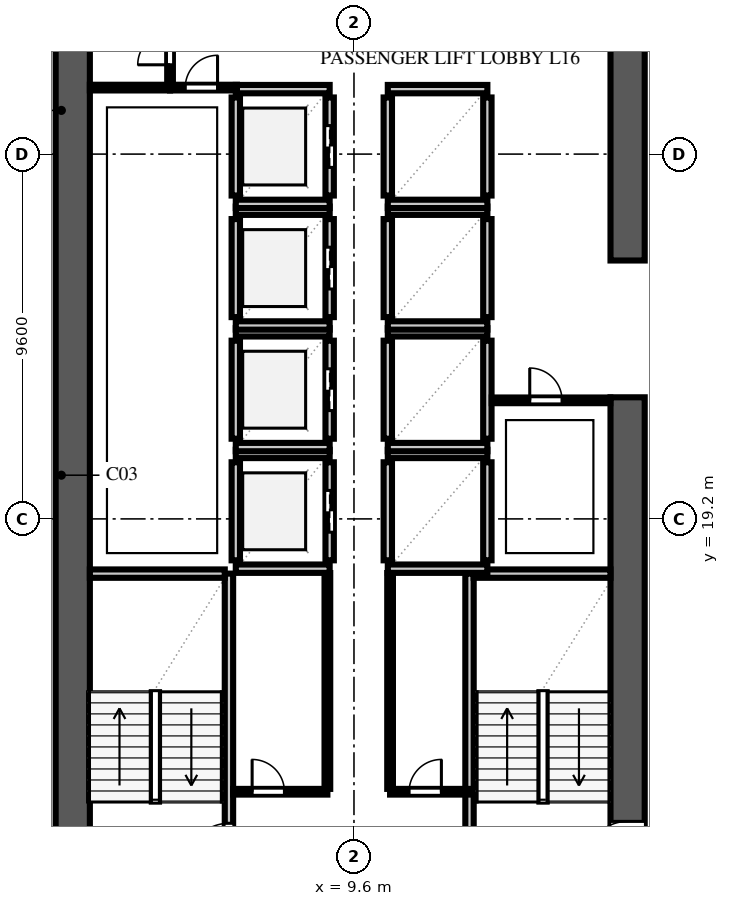
"""IFC4 building model, lengths in metres.
Left out: names, types, materials, properties, quantities, classifications, styles, units other than length and angle.
Written with IfcOpenShell. Run it as: python <this file> out.ifc"""

import sys

from ifc_helpers import new_model, si_unit, direction, frame, frame_2d, origin, place, context, subcontext, project, spatial, rectangle, extrude, element, fill, save


model = new_model("IFC4")
c1 = context("Model", 3, precision=1e-05, world=origin(), true_north=direction((0.0, 1.0)))
c2 = subcontext(c1, "Body", "Model", "MODEL_VIEW")
j1 = project(units=[si_unit("LENGTHUNIT", "METRE"), si_unit("PLANEANGLEUNIT", "RADIAN")], contexts=[c1])
p1 = place(None, origin())
s1 = spatial("IfcSite", under=j1, at=p1, CompositionType="ELEMENT")
p2 = place(p1, origin())
s2 = spatial("IfcBuilding", under=s1, at=p2, CompositionType="ELEMENT")
p3 = place(p2, frame((0.0, 0.0, 66.0)))
s3 = spatial("IfcBuildingStorey", under=s2, at=p3, CompositionType="ELEMENT", Elevation=66.0)
p4 = place(p3, frame((2.2, 9.15, 0.0), z_axis=(0.0, 0.0, 1.0), x_axis=(0.0, 1.0, 0.0)))
e1 = element("IfcWall", 1, at=p4, inside=s3, PredefinedType="SHEAR", context=c2, shape_type="SweptSolid", body=[
    extrude(rectangle(XDim=39.3, YDim=0.9, at=frame_2d((19.65, 0.0))), origin(), (0.0, 0.0, 1.0), 3.54),
])
p5 = place(p3, frame((16.8, 10.05, 0.0), z_axis=(0.0, 0.0, 1.0), x_axis=(0.0, 1.0, 0.0)))
e2 = element("IfcWall", 2, at=p5, inside=s3, PredefinedType="SHEAR", context=c2, shape_type="SweptSolid", body=[
    extrude(rectangle(XDim=12.35, YDim=0.9, at=frame_2d((6.175, 0.0))), origin(), (0.0, 0.0, 1.0), 3.54),
])
p6 = place(p5, frame((0.09, 0.0, 0.0)))
e3 = element("IfcOpeningElement", 3, at=p6, cuts=e2, PredefinedType="OPENING", context=c2, shape_type="SweptSolid", body=[
    extrude(rectangle(XDim=1.1, YDim=2.2, at=frame_2d((0.55, 1.1))), frame((0.0, 0.462, 0.0), z_axis=(0.0, -1.0, 0.0), x_axis=(1.0, 0.0, 0.0)), (0.0, 0.0, 1.0), 0.924),
])
p7 = place(p3, frame((16.8, 26.0, 0.0), z_axis=(0.0, 0.0, 1.0), x_axis=(0.0, 1.0, 0.0)))
e4 = element("IfcWall", 4, at=p7, inside=s3, PredefinedType="SHEAR", context=c2, shape_type="SweptSolid", body=[
    extrude(rectangle(XDim=7.8, YDim=0.9, at=frame_2d((3.9, 0.0))), origin(), (0.0, 0.0, 1.0), 3.54),
])
p8 = place(p3, frame((6.31, 9.95, 0.0), z_axis=(0.0, 0.0, 1.0), x_axis=(0.0, 1.0, 0.0)))
e5 = element("IfcWall", 5, at=p8, inside=s3, PredefinedType="SOLIDWALL", context=c2, shape_type="SweptSolid", body=[
    extrude(rectangle(XDim=7.81, YDim=0.22, at=frame_2d((3.905, 0.0))), origin(), (0.0, 0.0, 1.0), 3.54),
])
p9 = place(p8, frame((0.14, 0.0, 0.0)))
e6 = element("IfcOpeningElement", 6, at=p9, cuts=e5, PredefinedType="OPENING", context=c2, shape_type="SweptSolid", body=[
    extrude(rectangle(XDim=1.1, YDim=2.2, at=frame_2d((0.55, 1.1))), frame((0.0, 0.122, 0.0), z_axis=(0.0, -1.0, 0.0), x_axis=(1.0, 0.0, 0.0)), (0.0, 0.0, 1.0), 0.244),
])
p10 = place(p3, frame((2.65, 17.76, 0.0), z_axis=(0.0, 0.0, 1.0), x_axis=(1.0, 0.0, 0.0)))
e7 = element("IfcWall", 7, at=p10, inside=s3, PredefinedType="SOLIDWALL", context=c2, shape_type="SweptSolid", body=[
    extrude(rectangle(XDim=3.55, YDim=0.22, at=frame_2d((1.775, 0.0))), origin(), (0.0, 0.0, 1.0), 3.54),
])
p11 = place(p3, frame((12.64, 10.05, 0.0), z_axis=(0.0, 0.0, 1.0), x_axis=(0.0, 1.0, 0.0)))
e8 = element("IfcWall", 8, at=p11, inside=s3, PredefinedType="SOLIDWALL", context=c2, shape_type="SweptSolid", body=[
    extrude(rectangle(XDim=7.71, YDim=0.22, at=frame_2d((3.855, 0.0))), origin(), (0.0, 0.0, 1.0), 3.54),
])
p12 = place(p3, frame((12.75, 17.76, 0.0), z_axis=(0.0, 0.0, 1.0), x_axis=(1.0, 0.0, 0.0)))
e9 = element("IfcWall", 9, at=p12, inside=s3, PredefinedType="SOLIDWALL", context=c2, shape_type="SweptSolid", body=[
    extrude(rectangle(XDim=3.6, YDim=0.22, at=frame_2d((1.8, 0.0))), origin(), (0.0, 0.0, 1.0), 3.54),
])
p13 = place(p3, frame((6.49, 18.11, 0.0), z_axis=(0.0, 0.0, 1.0), x_axis=(0.0, 1.0, 0.0)))
e10 = element("IfcWall", 10, at=p13, inside=s3, PredefinedType="SOLIDWALL", context=c2, shape_type="SweptSolid", body=[
    extrude(rectangle(XDim=2.58, YDim=0.22, at=frame_2d((1.29, 0.0))), origin(), (0.0, 0.0, 1.0), 3.54),
])
p14 = place(p3, frame((8.96, 18.11, 0.0), z_axis=(0.0, 0.0, 1.0), x_axis=(0.0, 1.0, 0.0)))
e11 = element("IfcWall", 11, at=p14, inside=s3, PredefinedType="SOLIDWALL", context=c2, shape_type="SweptSolid", body=[
    extrude(rectangle(XDim=2.58, YDim=0.22, at=frame_2d((1.29, 0.0))), origin(), (0.0, 0.0, 1.0), 3.54),
])
p15 = place(p14, frame((0.74, 0.0, 0.0)))
e12 = element("IfcOpeningElement", 12, at=p15, cuts=e11, PredefinedType="OPENING", context=c2, shape_type="SweptSolid", body=[
    extrude(rectangle(XDim=1.1, YDim=2.2, at=frame_2d((0.55, 1.1))), frame((0.0, 0.122, 0.0), z_axis=(0.0, -1.0, 0.0), x_axis=(1.0, 0.0, 0.0)), (0.0, 0.0, 1.0), 0.244),
])
for number, where, z_axis, x_axis in (
    (13, (6.49, 17.89, 0.0), (0.0, 0.0, 1.0), (1.0, 0.0, 0.0)),
    (14, (6.49, 20.91, 0.0), (0.0, 0.0, 1.0), (1.0, 0.0, 0.0)),
):
    element("IfcWall", number, at=place(p3, frame(where, z_axis=z_axis, x_axis=x_axis)), inside=s3, PredefinedType="SOLIDWALL", context=c2, shape_type="SweptSolid", body=[
        extrude(rectangle(XDim=2.47, YDim=0.22, at=frame_2d((1.235, 0.0))), origin(), (0.0, 0.0, 1.0), 3.54),
    ])
p16 = place(p3, frame((6.49, 21.31, 0.0), z_axis=(0.0, 0.0, 1.0), x_axis=(0.0, 1.0, 0.0)))
e15 = element("IfcWall", 15, at=p16, inside=s3, PredefinedType="SOLIDWALL", context=c2, shape_type="SweptSolid", body=[
    extrude(rectangle(XDim=2.58, YDim=0.22, at=frame_2d((1.29, 0.0))), origin(), (0.0, 0.0, 1.0), 3.54),
])
p17 = place(p3, frame((8.96, 21.31, 0.0), z_axis=(0.0, 0.0, 1.0), x_axis=(0.0, 1.0, 0.0)))
e16 = element("IfcWall", 16, at=p17, inside=s3, PredefinedType="SOLIDWALL", context=c2, shape_type="SweptSolid", body=[
    extrude(rectangle(XDim=2.58, YDim=0.22, at=frame_2d((1.29, 0.0))), origin(), (0.0, 0.0, 1.0), 3.54),
])
p18 = place(p17, frame((0.74, 0.0, 0.0)))
e17 = element("IfcOpeningElement", 17, at=p18, cuts=e16, PredefinedType="OPENING", context=c2, shape_type="SweptSolid", body=[
    extrude(rectangle(XDim=1.1, YDim=2.2, at=frame_2d((0.55, 1.1))), frame((0.0, 0.122, 0.0), z_axis=(0.0, -1.0, 0.0), x_axis=(1.0, 0.0, 0.0)), (0.0, 0.0, 1.0), 0.244),
])
for number, where, z_axis, x_axis in (
    (18, (6.49, 21.09, 0.0), (0.0, 0.0, 1.0), (1.0, 0.0, 0.0)),
    (19, (6.49, 24.11, 0.0), (0.0, 0.0, 1.0), (1.0, 0.0, 0.0)),
):
    element("IfcWall", number, at=place(p3, frame(where, z_axis=z_axis, x_axis=x_axis)), inside=s3, PredefinedType="SOLIDWALL", context=c2, shape_type="SweptSolid", body=[
        extrude(rectangle(XDim=2.47, YDim=0.22, at=frame_2d((1.235, 0.0))), origin(), (0.0, 0.0, 1.0), 3.54),
    ])
p19 = place(p3, frame((6.49, 24.51, 0.0), z_axis=(0.0, 0.0, 1.0), x_axis=(0.0, 1.0, 0.0)))
e20 = element("IfcWall", 20, at=p19, inside=s3, PredefinedType="SOLIDWALL", context=c2, shape_type="SweptSolid", body=[
    extrude(rectangle(XDim=2.58, YDim=0.22, at=frame_2d((1.29, 0.0))), origin(), (0.0, 0.0, 1.0), 3.54),
])
p20 = place(p3, frame((8.96, 24.51, 0.0), z_axis=(0.0, 0.0, 1.0), x_axis=(0.0, 1.0, 0.0)))
e21 = element("IfcWall", 21, at=p20, inside=s3, PredefinedType="SOLIDWALL", context=c2, shape_type="SweptSolid", body=[
    extrude(rectangle(XDim=2.58, YDim=0.22, at=frame_2d((1.29, 0.0))), origin(), (0.0, 0.0, 1.0), 3.54),
])
p21 = place(p20, frame((0.74, 0.0, 0.0)))
e22 = element("IfcOpeningElement", 22, at=p21, cuts=e21, PredefinedType="OPENING", context=c2, shape_type="SweptSolid", body=[
    extrude(rectangle(XDim=1.1, YDim=2.2, at=frame_2d((0.55, 1.1))), frame((0.0, 0.122, 0.0), z_axis=(0.0, -1.0, 0.0), x_axis=(1.0, 0.0, 0.0)), (0.0, 0.0, 1.0), 0.244),
])
for number, where, z_axis, x_axis in (
    (23, (6.49, 24.29, 0.0), (0.0, 0.0, 1.0), (1.0, 0.0, 0.0)),
    (24, (6.49, 27.31, 0.0), (0.0, 0.0, 1.0), (1.0, 0.0, 0.0)),
):
    element("IfcWall", number, at=place(p3, frame(where, z_axis=z_axis, x_axis=x_axis)), inside=s3, PredefinedType="SOLIDWALL", context=c2, shape_type="SweptSolid", body=[
        extrude(rectangle(XDim=2.47, YDim=0.22, at=frame_2d((1.235, 0.0))), origin(), (0.0, 0.0, 1.0), 3.54),
    ])
p22 = place(p3, frame((6.49, 27.71, 0.0), z_axis=(0.0, 0.0, 1.0), x_axis=(0.0, 1.0, 0.0)))
e25 = element("IfcWall", 25, at=p22, inside=s3, PredefinedType="SOLIDWALL", context=c2, shape_type="SweptSolid", body=[
    extrude(rectangle(XDim=2.58, YDim=0.22, at=frame_2d((1.29, 0.0))), origin(), (0.0, 0.0, 1.0), 3.54),
])
p23 = place(p3, frame((8.96, 27.71, 0.0), z_axis=(0.0, 0.0, 1.0), x_axis=(0.0, 1.0, 0.0)))
e26 = element("IfcWall", 26, at=p23, inside=s3, PredefinedType="SOLIDWALL", context=c2, shape_type="SweptSolid", body=[
    extrude(rectangle(XDim=2.58, YDim=0.22, at=frame_2d((1.29, 0.0))), origin(), (0.0, 0.0, 1.0), 3.54),
])
p24 = place(p23, frame((0.74, 0.0, 0.0)))
e27 = element("IfcOpeningElement", 27, at=p24, cuts=e26, PredefinedType="OPENING", context=c2, shape_type="SweptSolid", body=[
    extrude(rectangle(XDim=1.1, YDim=2.2, at=frame_2d((0.55, 1.1))), frame((0.0, 0.122, 0.0), z_axis=(0.0, -1.0, 0.0), x_axis=(1.0, 0.0, 0.0)), (0.0, 0.0, 1.0), 0.244),
])
for number, where, z_axis, x_axis in (
    (28, (6.49, 27.49, 0.0), (0.0, 0.0, 1.0), (1.0, 0.0, 0.0)),
    (29, (6.49, 30.51, 0.0), (0.0, 0.0, 1.0), (1.0, 0.0, 0.0)),
):
    element("IfcWall", number, at=place(p3, frame(where, z_axis=z_axis, x_axis=x_axis)), inside=s3, PredefinedType="SOLIDWALL", context=c2, shape_type="SweptSolid", body=[
        extrude(rectangle(XDim=2.47, YDim=0.22, at=frame_2d((1.235, 0.0))), origin(), (0.0, 0.0, 1.0), 3.54),
    ])
for number, where, z_axis, x_axis in (
    (30, (10.49, 18.11, 0.0), (0.0, 0.0, 1.0), (0.0, 1.0, 0.0)),
    (31, (13.11, 18.11, 0.0), (0.0, 0.0, 1.0), (0.0, 1.0, 0.0)),
):
    element("IfcWall", number, at=place(p3, frame(where, z_axis=z_axis, x_axis=x_axis)), inside=s3, PredefinedType="SOLIDWALL", context=c2, shape_type="SweptSolid", body=[
        extrude(rectangle(XDim=2.58, YDim=0.22, at=frame_2d((1.29, 0.0))), origin(), (0.0, 0.0, 1.0), 3.54),
    ])
for number, where, z_axis, x_axis in (
    (32, (10.49, 17.89, 0.0), (0.0, 0.0, 1.0), (1.0, 0.0, 0.0)),
    (33, (10.49, 20.91, 0.0), (0.0, 0.0, 1.0), (1.0, 0.0, 0.0)),
):
    element("IfcWall", number, at=place(p3, frame(where, z_axis=z_axis, x_axis=x_axis)), inside=s3, PredefinedType="SOLIDWALL", context=c2, shape_type="SweptSolid", body=[
        extrude(rectangle(XDim=2.62, YDim=0.22, at=frame_2d((1.31, 0.0))), origin(), (0.0, 0.0, 1.0), 3.54),
    ])
for number, where, z_axis, x_axis in (
    (34, (10.49, 21.31, 0.0), (0.0, 0.0, 1.0), (0.0, 1.0, 0.0)),
    (35, (13.11, 21.31, 0.0), (0.0, 0.0, 1.0), (0.0, 1.0, 0.0)),
):
    element("IfcWall", number, at=place(p3, frame(where, z_axis=z_axis, x_axis=x_axis)), inside=s3, PredefinedType="SOLIDWALL", context=c2, shape_type="SweptSolid", body=[
        extrude(rectangle(XDim=2.58, YDim=0.22, at=frame_2d((1.29, 0.0))), origin(), (0.0, 0.0, 1.0), 3.54),
    ])
for number, where, z_axis, x_axis in (
    (36, (10.49, 21.09, 0.0), (0.0, 0.0, 1.0), (1.0, 0.0, 0.0)),
    (37, (10.49, 24.11, 0.0), (0.0, 0.0, 1.0), (1.0, 0.0, 0.0)),
):
    element("IfcWall", number, at=place(p3, frame(where, z_axis=z_axis, x_axis=x_axis)), inside=s3, PredefinedType="SOLIDWALL", context=c2, shape_type="SweptSolid", body=[
        extrude(rectangle(XDim=2.62, YDim=0.22, at=frame_2d((1.31, 0.0))), origin(), (0.0, 0.0, 1.0), 3.54),
    ])
for number, where, z_axis, x_axis in (
    (38, (10.49, 24.51, 0.0), (0.0, 0.0, 1.0), (0.0, 1.0, 0.0)),
    (39, (13.11, 24.51, 0.0), (0.0, 0.0, 1.0), (0.0, 1.0, 0.0)),
):
    element("IfcWall", number, at=place(p3, frame(where, z_axis=z_axis, x_axis=x_axis)), inside=s3, PredefinedType="SOLIDWALL", context=c2, shape_type="SweptSolid", body=[
        extrude(rectangle(XDim=2.58, YDim=0.22, at=frame_2d((1.29, 0.0))), origin(), (0.0, 0.0, 1.0), 3.54),
    ])
for number, where, z_axis, x_axis in (
    (40, (10.49, 24.29, 0.0), (0.0, 0.0, 1.0), (1.0, 0.0, 0.0)),
    (41, (10.49, 27.31, 0.0), (0.0, 0.0, 1.0), (1.0, 0.0, 0.0)),
):
    element("IfcWall", number, at=place(p3, frame(where, z_axis=z_axis, x_axis=x_axis)), inside=s3, PredefinedType="SOLIDWALL", context=c2, shape_type="SweptSolid", body=[
        extrude(rectangle(XDim=2.62, YDim=0.22, at=frame_2d((1.31, 0.0))), origin(), (0.0, 0.0, 1.0), 3.54),
    ])
for number, where, z_axis, x_axis in (
    (42, (10.49, 27.71, 0.0), (0.0, 0.0, 1.0), (0.0, 1.0, 0.0)),
    (43, (13.11, 27.71, 0.0), (0.0, 0.0, 1.0), (0.0, 1.0, 0.0)),
):
    element("IfcWall", number, at=place(p3, frame(where, z_axis=z_axis, x_axis=x_axis)), inside=s3, PredefinedType="SOLIDWALL", context=c2, shape_type="SweptSolid", body=[
        extrude(rectangle(XDim=2.58, YDim=0.22, at=frame_2d((1.29, 0.0))), origin(), (0.0, 0.0, 1.0), 3.54),
    ])
for number, where, z_axis, x_axis in (
    (44, (10.49, 27.49, 0.0), (0.0, 0.0, 1.0), (1.0, 0.0, 0.0)),
    (45, (10.49, 30.51, 0.0), (0.0, 0.0, 1.0), (1.0, 0.0, 0.0)),
):
    element("IfcWall", number, at=place(p3, frame(where, z_axis=z_axis, x_axis=x_axis)), inside=s3, PredefinedType="SOLIDWALL", context=c2, shape_type="SweptSolid", body=[
        extrude(rectangle(XDim=2.62, YDim=0.22, at=frame_2d((1.31, 0.0))), origin(), (0.0, 0.0, 1.0), 3.54),
    ])
p25 = place(p3, frame((6.42, 12.02, 0.0), z_axis=(0.0, 0.0, 1.0), x_axis=(1.0, 0.0, 0.0)))
e46 = element("IfcWall", 46, at=p25, inside=s3, PredefinedType="PARTITIONING", context=c2, shape_type="SweptSolid", body=[
    extrude(rectangle(XDim=2.48, YDim=0.15, at=frame_2d((1.24, 0.0))), origin(), (0.0, 0.0, 1.0), 3.54),
])
p26 = place(p25, frame((0.5, 0.0, 0.0)))
e47 = element("IfcOpeningElement", 47, at=p26, cuts=e46, PredefinedType="OPENING", context=c2, shape_type="SweptSolid", body=[
    extrude(rectangle(XDim=0.85, YDim=2.1, at=frame_2d((0.425, 1.05))), frame((0.0, 0.087, 0.0), z_axis=(0.0, -1.0, 0.0), x_axis=(1.0, 0.0, 0.0)), (0.0, 0.0, 1.0), 0.174),
])
p27 = place(p3, frame((10.55, 12.02, 0.0), z_axis=(0.0, 0.0, 1.0), x_axis=(1.0, 0.0, 0.0)))
e48 = element("IfcWall", 48, at=p27, inside=s3, PredefinedType="PARTITIONING", context=c2, shape_type="SweptSolid", body=[
    extrude(rectangle(XDim=2.08, YDim=0.15, at=frame_2d((1.04, 0.0))), origin(), (0.0, 0.0, 1.0), 3.54),
])
p28 = place(p27, frame((0.5, 0.0, 0.0)))
e49 = element("IfcOpeningElement", 49, at=p28, cuts=e48, PredefinedType="OPENING", context=c2, shape_type="SweptSolid", body=[
    extrude(rectangle(XDim=0.85, YDim=2.1, at=frame_2d((0.425, 1.05))), frame((0.0, 0.087, 0.0), z_axis=(0.0, -1.0, 0.0), x_axis=(1.0, 0.0, 0.0)), (0.0, 0.0, 1.0), 0.174),
])
for number, where, z_axis, x_axis in (
    (50, (8.9, 12.095, 0.0), (0.0, 0.0, 1.0), (0.0, 1.0, 0.0)),
    (51, (10.55, 12.095, 0.0), (0.0, 0.0, 1.0), (0.0, 1.0, 0.0)),
):
    element("IfcWall", number, at=place(p3, frame(where, z_axis=z_axis, x_axis=x_axis)), inside=s3, PredefinedType="PARTITIONING", context=c2, shape_type="SweptSolid", body=[
        extrude(rectangle(XDim=5.68, YDim=0.15, at=frame_2d((2.84, 0.0))), origin(), (0.0, 0.0, 1.0), 3.54),
    ])
p29 = place(p3, frame((13.225, 22.32, 0.0), z_axis=(0.0, 0.0, 1.0), x_axis=(1.0, 0.0, 0.0)))
e52 = element("IfcWall", 52, at=p29, inside=s3, PredefinedType="PARTITIONING", context=c2, shape_type="SweptSolid", body=[
    extrude(rectangle(XDim=3.12, YDim=0.15, at=frame_2d((1.56, 0.0))), origin(), (0.0, 0.0, 1.0), 3.54),
])
p30 = place(p29, frame((1.0, 0.0, 0.0)))
e53 = element("IfcOpeningElement", 53, at=p30, cuts=e52, PredefinedType="OPENING", context=c2, shape_type="SweptSolid", body=[
    extrude(rectangle(XDim=0.85, YDim=2.1, at=frame_2d((0.425, 1.05))), frame((0.0, 0.087, 0.0), z_axis=(0.0, -1.0, 0.0), x_axis=(1.0, 0.0, 0.0)), (0.0, 0.0, 1.0), 0.174),
])
p31 = place(p3, frame((4.76, 30.55, 0.0), z_axis=(0.0, 0.0, 1.0), x_axis=(0.0, 1.0, 0.0)))
e54 = element("IfcWall", 54, at=p31, inside=s3, PredefinedType="PARTITIONING", context=c2, shape_type="SweptSolid", body=[
    extrude(rectangle(XDim=2.93, YDim=0.15, at=frame_2d((1.465, 0.0))), origin(), (0.0, 0.0, 1.0), 3.54),
])
p32 = place(p31, frame((0.6, 0.0, 0.0)))
e55 = element("IfcOpeningElement", 55, at=p32, cuts=e54, PredefinedType="OPENING", context=c2, shape_type="SweptSolid", body=[
    extrude(rectangle(XDim=0.85, YDim=2.1, at=frame_2d((0.425, 1.05))), frame((0.0, 0.087, 0.0), z_axis=(0.0, -1.0, 0.0), x_axis=(1.0, 0.0, 0.0)), (0.0, 0.0, 1.0), 0.174),
])
p33 = place(p3, frame((4.76, 30.55, 0.0), z_axis=(0.0, 0.0, 1.0), x_axis=(1.0, 0.0, 0.0)))
e56 = element("IfcWall", 56, at=p33, inside=s3, PredefinedType="PARTITIONING", context=c2, shape_type="SweptSolid", body=[
    extrude(rectangle(XDim=1.76, YDim=0.15, at=frame_2d((0.88, 0.0))), origin(), (0.0, 0.0, 1.0), 3.54),
])
p34 = place(p33, frame((0.4, 0.0, 0.0)))
e57 = element("IfcOpeningElement", 57, at=p34, cuts=e56, PredefinedType="OPENING", context=c2, shape_type="SweptSolid", body=[
    extrude(rectangle(XDim=0.85, YDim=2.1, at=frame_2d((0.425, 1.05))), frame((0.0, 0.087, 0.0), z_axis=(0.0, -1.0, 0.0), x_axis=(1.0, 0.0, 0.0)), (0.0, 0.0, 1.0), 0.174),
])
p35 = place(p3, frame((2.65, 30.55, 0.0), z_axis=(0.0, 0.0, 1.0), x_axis=(1.0, 0.0, 0.0)))
e58 = element("IfcWall", 58, at=p35, inside=s3, PredefinedType="PARTITIONING", context=c2, shape_type="SweptSolid", body=[
    extrude(rectangle(XDim=2.11, YDim=0.15, at=frame_2d((1.055, 0.0))), origin(), (0.0, 0.0, 1.0), 3.54),
])
p36 = place(p9, origin())
e59 = element("IfcDoor", 59, at=p36, inside=s3, OperationType="SINGLE_SWING_LEFT", PredefinedType="DOOR", context=c2, shape_type="SweptSolid", body=[
    extrude(rectangle(XDim=1.1, YDim=2.2, at=frame_2d((0.55, 1.1))), frame((0.0, 0.025, 0.0), z_axis=(0.0, -1.0, 0.0), x_axis=(1.0, 0.0, 0.0)), (0.0, 0.0, 1.0), 0.05),
])
fill(e6, e59)
p37 = place(p6, origin())
e60 = element("IfcDoor", 60, at=p37, inside=s3, OperationType="SINGLE_SWING_LEFT", PredefinedType="DOOR", context=c2, shape_type="SweptSolid", body=[
    extrude(rectangle(XDim=1.1, YDim=2.2, at=frame_2d((0.55, 1.1))), frame((0.0, 0.025, 0.0), z_axis=(0.0, -1.0, 0.0), x_axis=(1.0, 0.0, 0.0)), (0.0, 0.0, 1.0), 0.05),
])
fill(e3, e60)
p38 = place(p15, origin())
e61 = element("IfcDoor", 61, at=p38, inside=s3, OperationType="DOUBLE_DOOR_SLIDING", PredefinedType="DOOR", context=c2, shape_type="SweptSolid", body=[
    extrude(rectangle(XDim=1.1, YDim=2.2, at=frame_2d((0.55, 1.1))), frame((0.0, 0.025, 0.0), z_axis=(0.0, -1.0, 0.0), x_axis=(1.0, 0.0, 0.0)), (0.0, 0.0, 1.0), 0.05),
])
fill(e12, e61)
p39 = place(p18, origin())
e62 = element("IfcDoor", 62, at=p39, inside=s3, OperationType="DOUBLE_DOOR_SLIDING", PredefinedType="DOOR", context=c2, shape_type="SweptSolid", body=[
    extrude(rectangle(XDim=1.1, YDim=2.2, at=frame_2d((0.55, 1.1))), frame((0.0, 0.025, 0.0), z_axis=(0.0, -1.0, 0.0), x_axis=(1.0, 0.0, 0.0)), (0.0, 0.0, 1.0), 0.05),
])
fill(e17, e62)
p40 = place(p21, origin())
e63 = element("IfcDoor", 63, at=p40, inside=s3, OperationType="DOUBLE_DOOR_SLIDING", PredefinedType="DOOR", context=c2, shape_type="SweptSolid", body=[
    extrude(rectangle(XDim=1.1, YDim=2.2, at=frame_2d((0.55, 1.1))), frame((0.0, 0.025, 0.0), z_axis=(0.0, -1.0, 0.0), x_axis=(1.0, 0.0, 0.0)), (0.0, 0.0, 1.0), 0.05),
])
fill(e22, e63)
p41 = place(p24, origin())
e64 = element("IfcDoor", 64, at=p41, inside=s3, OperationType="DOUBLE_DOOR_SLIDING", PredefinedType="DOOR", context=c2, shape_type="SweptSolid", body=[
    extrude(rectangle(XDim=1.1, YDim=2.2, at=frame_2d((0.55, 1.1))), frame((0.0, 0.025, 0.0), z_axis=(0.0, -1.0, 0.0), x_axis=(1.0, 0.0, 0.0)), (0.0, 0.0, 1.0), 0.05),
])
fill(e27, e64)
p42 = place(p26, origin())
e65 = element("IfcDoor", 65, at=p42, inside=s3, OperationType="SINGLE_SWING_LEFT", PredefinedType="DOOR", context=c2, shape_type="SweptSolid", body=[
    extrude(rectangle(XDim=0.85, YDim=2.1, at=frame_2d((0.425, 1.05))), frame((0.0, 0.025, 0.0), z_axis=(0.0, -1.0, 0.0), x_axis=(1.0, 0.0, 0.0)), (0.0, 0.0, 1.0), 0.05),
])
fill(e47, e65)
p43 = place(p28, origin())
e66 = element("IfcDoor", 66, at=p43, inside=s3, OperationType="SINGLE_SWING_RIGHT", PredefinedType="DOOR", context=c2, shape_type="SweptSolid", body=[
    extrude(rectangle(XDim=0.85, YDim=2.1, at=frame_2d((0.425, 1.05))), frame((0.0, 0.025, 0.0), z_axis=(0.0, -1.0, 0.0), x_axis=(1.0, 0.0, 0.0)), (0.0, 0.0, 1.0), 0.05),
])
fill(e49, e66)
p44 = place(p30, origin())
e67 = element("IfcDoor", 67, at=p44, inside=s3, OperationType="SINGLE_SWING_LEFT", PredefinedType="DOOR", context=c2, shape_type="SweptSolid", body=[
    extrude(rectangle(XDim=0.85, YDim=2.1, at=frame_2d((0.425, 1.05))), frame((0.0, 0.025, 0.0), z_axis=(0.0, -1.0, 0.0), x_axis=(1.0, 0.0, 0.0)), (0.0, 0.0, 1.0), 0.05),
])
fill(e53, e67)
p45 = place(p32, origin())
e68 = element("IfcDoor", 68, at=p45, inside=s3, OperationType="SINGLE_SWING_LEFT", PredefinedType="DOOR", context=c2, shape_type="SweptSolid", body=[
    extrude(rectangle(XDim=0.85, YDim=2.1, at=frame_2d((0.425, 1.05))), frame((0.0, 0.025, 0.0), z_axis=(0.0, -1.0, 0.0), x_axis=(1.0, 0.0, 0.0)), (0.0, 0.0, 1.0), 0.05),
])
fill(e55, e68)
p46 = place(p34, origin())
e69 = element("IfcDoor", 69, at=p46, inside=s3, OperationType="SINGLE_SWING_RIGHT", PredefinedType="DOOR", context=c2, shape_type="SweptSolid", body=[
    extrude(rectangle(XDim=0.85, YDim=2.1, at=frame_2d((0.425, 1.05))), frame((0.0, 0.025, 0.0), z_axis=(0.0, -1.0, 0.0), x_axis=(1.0, 0.0, 0.0)), (0.0, 0.0, 1.0), 0.05),
])
fill(e57, e69)
save(model, sys.argv[1])
